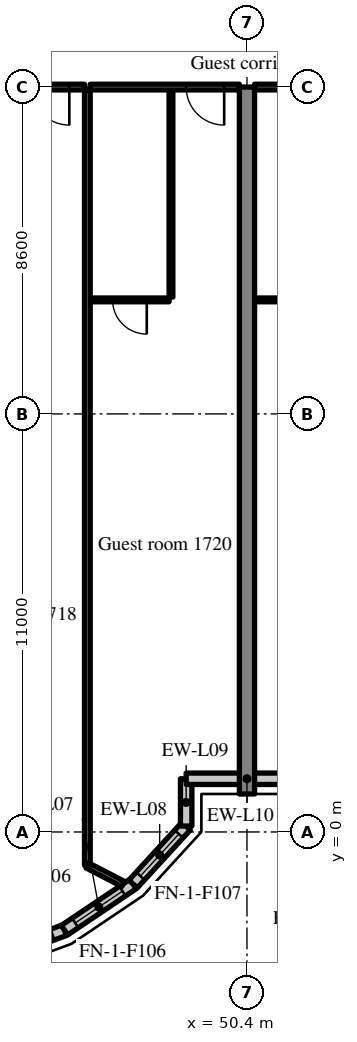
"""IFC4 building model, lengths in metres.
Left out: names, types, materials, properties, quantities, classifications, styles, units other than length and angle.
Written with IfcOpenShell. Run it as: python <this file> out.ifc"""

import sys

from ifc_helpers import new_model, si_unit, direction, frame, frame_2d, origin, place, context, subcontext, project, spatial, rectangle, extrude, source, transform, mapped, element, fill, save


model = new_model("IFC4")
c1 = context("Model", 3, precision=1e-05, world=origin(), true_north=direction((0.0, 1.0)))
c2 = subcontext(c1, "Body", "Model", "MODEL_VIEW")
j1 = project(units=[si_unit("LENGTHUNIT", "METRE"), si_unit("PLANEANGLEUNIT", "RADIAN")], contexts=[c1])
p1 = place(None, origin())
s1 = spatial("IfcSite", under=j1, at=p1, CompositionType="ELEMENT")
p2 = place(p1, origin())
s2 = spatial("IfcBuilding", under=s1, at=p2, CompositionType="ELEMENT")
p3 = place(p2, frame((0.0, 0.0, 73.4)))
s3 = spatial("IfcBuildingStorey", under=s2, at=p3, CompositionType="ELEMENT", Elevation=73.4)
m1 = source(origin(), c2, "Body", "SweptSolid", [
    extrude(rectangle(XDim=18.6, YDim=0.4, at=frame_2d((9.3, 0.0))), origin(), (0.0, 0.0, 1.0), 3.52),
])
p4 = place(p3, frame((50.4, 1.0, 0.0), z_axis=(0.0, 0.0, 1.0), x_axis=(0.0, 1.0, 0.0)))
e1 = element("IfcWall", 1, at=p4, inside=s3, PredefinedType="SHEAR", context=c2, shape_type="MappedRepresentation", body=[
    mapped(m1, transform((0.0, 0.0, 0.0), scale=1.0)),
])
m2 = source(origin(), c2, "Body", "SweptSolid", [
    extrude(rectangle(XDim=2.176, YDim=0.3, at=frame_2d((1.088, 0.0))), origin(), (0.0, 0.0, 1.0), 3.52),
])
p5 = place(p3, frame((43.56, -3.34, 0.0), z_axis=(0.0, 0.0, 1.0), x_axis=(0.937531979054, 0.347899106424, 0.0)))
e2 = element("IfcWall", 2, at=p5, inside=s3, PredefinedType="SOLIDWALL", context=c2, shape_type="MappedRepresentation", body=[
    mapped(m2, transform((0.0, 0.0, 0.0), scale=1.0)),
])
m3 = source(origin(), c2, "Body", "SweptSolid", [
    extrude(rectangle(XDim=1.5, YDim=2.0, at=frame_2d((0.75, 1.0))), frame((0.0, 0.16, 0.0), z_axis=(0.0, -1.0, 0.0), x_axis=(1.0, 0.0, 0.0)), (0.0, 0.0, 1.0), 0.32),
])
p6 = place(p5, frame((0.338, 0.0, 0.9)))
e3 = element("IfcOpeningElement", 3, at=p6, cuts=e2, PredefinedType="OPENING", context=c2, shape_type="MappedRepresentation", body=[
    mapped(m3, transform((0.0, 0.0, 0.0), scale=1.0)),
])
m4 = source(origin(), c2, "Body", "SweptSolid", [
    extrude(rectangle(XDim=2.176, YDim=0.3, at=frame_2d((1.088, 0.0))), origin(), (0.0, 0.0, 1.0), 3.52),
])
p7 = place(p3, frame((45.599, -2.583, 0.0), z_axis=(0.0, 0.0, 1.0), x_axis=(0.829625727223, 0.558319937607, 0.0)))
e4 = element("IfcWall", 4, at=p7, inside=s3, PredefinedType="SOLIDWALL", context=c2, shape_type="MappedRepresentation", body=[
    mapped(m4, transform((0.0, 0.0, 0.0), scale=1.0)),
])
p8 = place(p7, frame((0.338, 0.0, 0.9)))
e5 = element("IfcOpeningElement", 5, at=p8, cuts=e4, PredefinedType="OPENING", context=c2, shape_type="MappedRepresentation", body=[
    mapped(m3, transform((0.0, 0.0, 0.0), scale=1.0)),
])
m5 = source(origin(), c2, "Body", "SweptSolid", [
    extrude(rectangle(XDim=2.067, YDim=0.3, at=frame_2d((1.033, 0.0))), origin(), (0.0, 0.0, 1.0), 3.52),
])
p9 = place(p3, frame((47.404, -1.369, 0.0), z_axis=(0.0, 0.0, 1.0), x_axis=(0.675355439877, 0.737492393065, 0.0)))
e6 = element("IfcWall", 6, at=p9, inside=s3, PredefinedType="SOLIDWALL", context=c2, shape_type="MappedRepresentation", body=[
    mapped(m5, transform((0.0, 0.0, 0.0), scale=1.0)),
])
p10 = place(p9, frame((0.283, 0.0, 0.9)))
e7 = element("IfcOpeningElement", 7, at=p10, cuts=e6, PredefinedType="OPENING", context=c2, shape_type="MappedRepresentation", body=[
    mapped(m3, transform((0.0, 0.0, 0.0), scale=1.0)),
])
m6 = source(origin(), c2, "Body", "SweptSolid", [
    extrude(rectangle(XDim=1.244, YDim=0.3, at=frame_2d((0.622, 0.0))), origin(), (0.0, 0.0, 1.0), 3.52),
])
p11 = place(p3, frame((48.8, 0.156, 0.0), z_axis=(0.0, 0.0, 1.0), x_axis=(0.0, 1.0, 0.0)))
e8 = element("IfcWall", 8, at=p11, inside=s3, PredefinedType="SOLIDWALL", context=c2, shape_type="MappedRepresentation", body=[
    mapped(m6, transform((0.0, 0.0, 0.0), scale=1.0)),
])
m7 = source(origin(), c2, "Body", "SweptSolid", [
    extrude(rectangle(XDim=3.2, YDim=0.3, at=frame_2d((1.6, 0.0))), origin(), (0.0, 0.0, 1.0), 3.52),
])
p12 = place(p3, frame((48.8, 1.4, 0.0), z_axis=(0.0, 0.0, 1.0), x_axis=(1.0, 0.0, 0.0)))
e9 = element("IfcWall", 9, at=p12, inside=s3, PredefinedType="SOLIDWALL", context=c2, shape_type="MappedRepresentation", body=[
    mapped(m7, transform((0.0, 0.0, 0.0), scale=1.0)),
])
m8 = source(origin(), c2, "Body", "SweptSolid", [
    extrude(rectangle(XDim=3.925, YDim=0.15, at=frame_2d((1.962, 0.0))), origin(), (0.0, 0.0, 1.0), 2.82),
])
p13 = place(p3, frame((42.2, 19.6, 0.0), z_axis=(0.0, 0.0, 1.0), x_axis=(1.0, 0.0, 0.0)))
e10 = element("IfcWall", 10, at=p13, inside=s3, PredefinedType="PARTITIONING", context=c2, shape_type="MappedRepresentation", body=[
    mapped(m8, transform((0.0, 0.0, 0.0), scale=1.0)),
])
m9 = source(origin(), c2, "Body", "SweptSolid", [
    extrude(rectangle(XDim=1.0, YDim=2.1, at=frame_2d((0.5, 1.05))), frame((0.0, 0.085, 0.0), z_axis=(0.0, -1.0, 0.0), x_axis=(1.0, 0.0, 0.0)), (0.0, 0.0, 1.0), 0.17),
])
p14 = place(p13, frame((2.525, 0.0, 0.0)))
e11 = element("IfcOpeningElement", 11, at=p14, cuts=e10, PredefinedType="OPENING", context=c2, shape_type="MappedRepresentation", body=[
    mapped(m9, transform((0.0, 0.0, 0.0), scale=1.0)),
])
m10 = source(origin(), c2, "Body", "SweptSolid", [
    extrude(rectangle(XDim=5.45, YDim=0.1, at=frame_2d((2.725, 0.0))), origin(), (0.0, 0.0, 1.0), 3.52),
])
p15 = place(p3, frame((48.4, 14.075, 0.0), z_axis=(0.0, 0.0, 1.0), x_axis=(0.0, 1.0, 0.0)))
e12 = element("IfcWall", 12, at=p15, inside=s3, PredefinedType="PARTITIONING", context=c2, shape_type="MappedRepresentation", body=[
    mapped(m10, transform((0.0, 0.0, 0.0), scale=1.0)),
])
m11 = source(origin(), c2, "Body", "SweptSolid", [
    extrude(rectangle(XDim=2.075, YDim=0.1, at=frame_2d((1.038, 0.0))), origin(), (0.0, 0.0, 1.0), 3.52),
])
p16 = place(p3, frame((46.275, 14.0, 0.0), z_axis=(0.0, 0.0, 1.0), x_axis=(1.0, 0.0, 0.0)))
e13 = element("IfcWall", 13, at=p16, inside=s3, PredefinedType="PARTITIONING", context=c2, shape_type="MappedRepresentation", body=[
    mapped(m11, transform((0.0, 0.0, 0.0), scale=1.0)),
])
m12 = source(origin(), c2, "Body", "SweptSolid", [
    extrude(rectangle(XDim=0.9, YDim=2.1, at=frame_2d((0.45, 1.05))), frame((0.0, 0.06, 0.0), z_axis=(0.0, -1.0, 0.0), x_axis=(1.0, 0.0, 0.0)), (0.0, 0.0, 1.0), 0.12),
])
p17 = place(p16, frame((0.588, 0.0, 0.0)))
e14 = element("IfcOpeningElement", 14, at=p17, cuts=e13, PredefinedType="OPENING", context=c2, shape_type="MappedRepresentation", body=[
    mapped(m12, transform((0.0, 0.0, 0.0), scale=1.0)),
])
p18 = place(p3, frame((46.275, 19.6, 0.0), z_axis=(0.0, 0.0, 1.0), x_axis=(1.0, 0.0, 0.0)))
e15 = element("IfcWall", 15, at=p18, inside=s3, PredefinedType="PARTITIONING", context=c2, shape_type="MappedRepresentation", body=[
    mapped(m8, transform((0.0, 0.0, 0.0), scale=1.0)),
])
p19 = place(p18, frame((2.525, 0.0, 0.0)))
e16 = element("IfcOpeningElement", 16, at=p19, cuts=e15, PredefinedType="OPENING", context=c2, shape_type="MappedRepresentation", body=[
    mapped(m9, transform((0.0, 0.0, 0.0), scale=1.0)),
])
m13 = source(origin(), c2, "Body", "SweptSolid", [
    extrude(rectangle(XDim=20.406, YDim=0.15, at=frame_2d((10.203, 0.0))), origin(), (0.0, 0.0, 1.0), 3.52),
])
p20 = place(p3, frame((46.2, -0.881, 0.0), z_axis=(0.0, 0.0, 1.0), x_axis=(0.0, 1.0, 0.0)))
e17 = element("IfcWall", 17, at=p20, inside=s3, PredefinedType="PARTITIONING", context=c2, shape_type="MappedRepresentation", body=[
    mapped(m13, transform((0.0, 0.0, 0.0), scale=1.0)),
])
m14 = source(origin(), c2, "Body", "SweptSolid", [
    extrude(rectangle(XDim=2.55, YDim=0.1, at=frame_2d((1.275, 0.0))), origin(), (0.0, 0.0, 1.0), 3.52),
])
p21 = place(p3, frame((50.6, 14.0, 0.0), z_axis=(0.0, 0.0, 1.0), x_axis=(1.0, 0.0, 0.0)))
e18 = element("IfcWall", 18, at=p21, inside=s3, PredefinedType="PARTITIONING", context=c2, shape_type="MappedRepresentation", body=[
    mapped(m14, transform((0.0, 0.0, 0.0), scale=1.0)),
])
p22 = place(p21, frame((0.825, 0.0, 0.0)))
e19 = element("IfcOpeningElement", 19, at=p22, cuts=e18, PredefinedType="OPENING", context=c2, shape_type="MappedRepresentation", body=[
    mapped(m12, transform((0.0, 0.0, 0.0), scale=1.0)),
])
m15 = source(origin(), c2, "Body", "SweptSolid", [
    extrude(rectangle(XDim=8.0, YDim=0.15, at=frame_2d((4.0, 0.0))), origin(), (0.0, 0.0, 1.0), 2.82),
])
p23 = place(p3, frame((50.6, 19.6, 0.0), z_axis=(0.0, 0.0, 1.0), x_axis=(1.0, 0.0, 0.0)))
e20 = element("IfcWall", 20, at=p23, inside=s3, PredefinedType="PARTITIONING", context=c2, shape_type="MappedRepresentation", body=[
    mapped(m15, transform((0.0, 0.0, 0.0), scale=1.0)),
])
p24 = place(p23, frame((6.6, 0.0, 0.0)))
e21 = element("IfcOpeningElement", 21, at=p24, cuts=e20, PredefinedType="OPENING", context=c2, shape_type="MappedRepresentation", body=[
    mapped(m9, transform((0.0, 0.0, 0.0), scale=1.0)),
])
m16 = source(origin(), c2, "Body", "SweptSolid", [
    extrude(rectangle(XDim=1.058, YDim=0.15, at=frame_2d((0.529, 0.0))), origin(), (0.0, 0.0, 1.0), 3.52),
])
p25 = place(p3, frame((47.14, -1.366, 0.0), z_axis=(0.0, 0.0, 1.0), x_axis=(-0.888723819054, 0.458442988218, 0.0)))
e22 = element("IfcWall", 22, at=p25, inside=s3, PredefinedType="PARTITIONING", context=c2, shape_type="MappedRepresentation", body=[
    mapped(m16, transform((0.0, 0.0, 0.0), scale=1.0)),
])
m17 = source(origin(), c2, "Body", "SweptSolid", [
    extrude(rectangle(XDim=1.5, YDim=2.0, at=frame_2d((0.75, 1.0))), frame((0.0, 0.03, 0.0), z_axis=(0.0, -1.0, 0.0), x_axis=(1.0, 0.0, 0.0)), (0.0, 0.0, 1.0), 0.06),
])
p26 = place(p6, origin())
e23 = element("IfcWindow", 23, at=p26, inside=s3, PartitioningType="SINGLE_PANEL", PredefinedType="WINDOW", context=c2, shape_type="MappedRepresentation", body=[
    mapped(m17, transform((0.0, 0.0, 0.0), scale=1.0)),
])
fill(e3, e23)
p27 = place(p8, origin())
e24 = element("IfcWindow", 24, at=p27, inside=s3, PartitioningType="SINGLE_PANEL", PredefinedType="WINDOW", context=c2, shape_type="MappedRepresentation", body=[
    mapped(m17, transform((0.0, 0.0, 0.0), scale=1.0)),
])
fill(e5, e24)
p28 = place(p10, origin())
e25 = element("IfcWindow", 25, at=p28, inside=s3, PartitioningType="SINGLE_PANEL", PredefinedType="WINDOW", context=c2, shape_type="MappedRepresentation", body=[
    mapped(m17, transform((0.0, 0.0, 0.0), scale=1.0)),
])
fill(e7, e25)
m18 = source(origin(), c2, "Body", "SweptSolid", [
    extrude(rectangle(XDim=1.0, YDim=2.1, at=frame_2d((0.5, 1.05))), frame((0.0, 0.025, 0.0), z_axis=(0.0, -1.0, 0.0), x_axis=(1.0, 0.0, 0.0)), (0.0, 0.0, 1.0), 0.05),
])
p29 = place(p14, origin())
e26 = element("IfcDoor", 26, at=p29, inside=s3, OperationType="SINGLE_SWING_RIGHT", PredefinedType="DOOR", context=c2, shape_type="MappedRepresentation", body=[
    mapped(m18, transform((0.0, 0.0, 0.0), scale=1.0)),
])
fill(e11, e26)
m19 = source(origin(), c2, "Body", "SweptSolid", [
    extrude(rectangle(XDim=0.9, YDim=2.1, at=frame_2d((0.45, 1.05))), frame((0.0, 0.025, 0.0), z_axis=(0.0, -1.0, 0.0), x_axis=(1.0, 0.0, 0.0)), (0.0, 0.0, 1.0), 0.05),
])
p30 = place(p17, origin())
e27 = element("IfcDoor", 27, at=p30, inside=s3, OperationType="SINGLE_SWING_RIGHT", PredefinedType="DOOR", context=c2, shape_type="MappedRepresentation", body=[
    mapped(m19, transform((0.0, 0.0, 0.0), scale=1.0)),
])
fill(e14, e27)
p31 = place(p19, origin())
e28 = element("IfcDoor", 28, at=p31, inside=s3, OperationType="SINGLE_SWING_RIGHT", PredefinedType="DOOR", context=c2, shape_type="MappedRepresentation", body=[
    mapped(m18, transform((0.0, 0.0, 0.0), scale=1.0)),
])
fill(e16, e28)
save(model, sys.argv[1])
